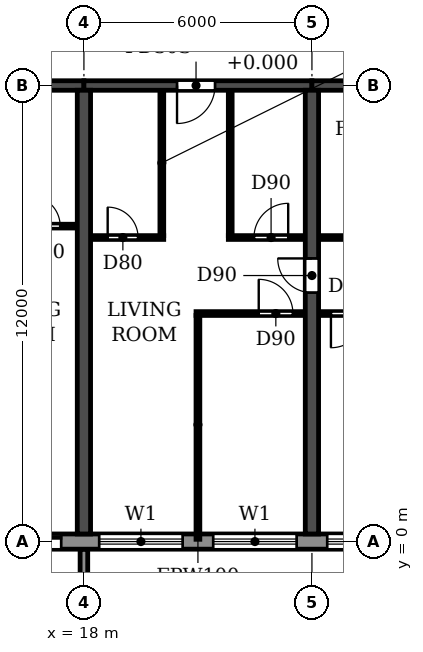
"""IFC4 building model, lengths in metres.
Left out: names, types, materials, properties, quantities, classifications, styles, units other than length and angle.
Written with IfcOpenShell. Run it as: python <this file> out.ifc"""

import sys

from ifc_helpers import new_model, si_unit, direction, frame, frame_2d, origin, place, context, subcontext, project, spatial, polyline, rectangle, outline, extrude, source, transform, mapped, element, fill, save


model = new_model("IFC4")
c1 = context("Model", 3, precision=1e-05, world=origin(), true_north=direction((0.0, 1.0)))
c2 = subcontext(c1, "Body", "Model", "MODEL_VIEW")
j1 = project(units=[si_unit("LENGTHUNIT", "METRE"), si_unit("PLANEANGLEUNIT", "RADIAN")], contexts=[c1])
p1 = place(None, origin())
s1 = spatial("IfcSite", under=j1, at=p1, CompositionType="ELEMENT")
p2 = place(p1, origin())
s2 = spatial("IfcBuilding", under=s1, at=p2, CompositionType="ELEMENT")
p3 = place(p2, frame((0.0, 0.0, 102.6)))
s3 = spatial("IfcBuildingStorey", under=s2, at=p3, CompositionType="ELEMENT", Elevation=102.6)
p4 = place(p3, frame((18.0, 0.2, 0.0), z_axis=(0.0, 0.0, 1.0), x_axis=(0.0, 1.0, 0.0)))
e1 = element("IfcWall", 1, at=p4, inside=s3, PredefinedType="SHEAR", context=c2, shape_type="SweptSolid", body=[
    extrude(rectangle(XDim=11.675, YDim=0.35, at=frame_2d((5.837, 0.0))), origin(), (0.0, 0.0, 1.0), 3.0),
])
p5 = place(p3, frame((24.0, 0.2, 0.0), z_axis=(0.0, 0.0, 1.0), x_axis=(0.0, 1.0, 0.0)))
e2 = element("IfcWall", 2, at=p5, inside=s3, PredefinedType="SHEAR", context=c2, shape_type="SweptSolid", body=[
    extrude(rectangle(XDim=11.675, YDim=0.35, at=frame_2d((5.837, 0.0))), origin(), (0.0, 0.0, 1.0), 3.0),
])
p6 = place(p5, frame((6.35, 0.0, 0.0)))
e3 = element("IfcOpeningElement", 3, at=p6, cuts=e2, PredefinedType="OPENING", context=c2, shape_type="SweptSolid", body=[
    extrude(rectangle(XDim=0.9, YDim=2.1, at=frame_2d((0.45, 1.05))), frame((0.0, 0.185, 0.0), z_axis=(0.0, -1.0, 0.0), x_axis=(1.0, 0.0, 0.0)), (0.0, 0.0, 1.0), 0.37),
])
p7 = place(p3, frame((12.0, 12.0, 0.0), z_axis=(0.0, 0.0, 1.0), x_axis=(1.0, 0.0, 0.0)))
e4 = element("IfcWall", 4, at=p7, inside=s3, PredefinedType="SHEAR", context=c2, shape_type="SweptSolid", body=[
    extrude(rectangle(XDim=6.0, YDim=0.25, at=frame_2d((3.0, 0.0))), origin(), (0.0, 0.0, 1.0), 2.4),
])
p8 = place(p7, frame((2.55, 0.0, 0.0)))
e5 = element("IfcOpeningElement", 5, at=p8, cuts=e4, PredefinedType="OPENING", context=c2, shape_type="SweptSolid", body=[
    extrude(rectangle(XDim=1.0, YDim=2.1, at=frame_2d((0.5, 1.05))), frame((0.0, 0.135, 0.0), z_axis=(0.0, -1.0, 0.0), x_axis=(1.0, 0.0, 0.0)), (0.0, 0.0, 1.0), 0.27),
])
p9 = place(p3, frame((18.0, 12.0, 0.0), z_axis=(0.0, 0.0, 1.0), x_axis=(1.0, 0.0, 0.0)))
e6 = element("IfcWall", 6, at=p9, inside=s3, PredefinedType="SHEAR", context=c2, shape_type="SweptSolid", body=[
    extrude(rectangle(XDim=6.0, YDim=0.25, at=frame_2d((3.0, 0.0))), origin(), (0.0, 0.0, 1.0), 2.4),
])
p10 = place(p9, frame((2.45, 0.0, 0.0)))
e7 = element("IfcOpeningElement", 7, at=p10, cuts=e6, PredefinedType="OPENING", context=c2, shape_type="SweptSolid", body=[
    extrude(rectangle(XDim=1.0, YDim=2.1, at=frame_2d((0.5, 1.05))), frame((0.0, 0.135, 0.0), z_axis=(0.0, -1.0, 0.0), x_axis=(1.0, 0.0, 0.0)), (0.0, 0.0, 1.0), 0.27),
])
p11 = place(p3, frame((24.0, 12.0, 0.0), z_axis=(0.0, 0.0, 1.0), x_axis=(1.0, 0.0, 0.0)))
e8 = element("IfcWall", 8, at=p11, inside=s3, PredefinedType="SHEAR", context=c2, shape_type="SweptSolid", body=[
    extrude(rectangle(XDim=6.0, YDim=0.25, at=frame_2d((3.0, 0.0))), origin(), (0.0, 0.0, 1.0), 2.4),
])
p12 = place(p3, frame((10.683, 0.0, 0.0), z_axis=(0.0, 0.0, 1.0), x_axis=(1.0, 0.0, 0.0)))
e9 = element("IfcWall", 9, at=p12, inside=s3, PredefinedType="STANDARD", context=c2, shape_type="SweptSolid", body=[
    extrude(rectangle(XDim=80.634, YDim=0.4, at=frame_2d((40.317, 0.0))), origin(), (0.0, 0.0, 1.0), 3.0),
])
p13 = place(p12, frame((1.717, 0.0, 0.9)))
e10 = element("IfcOpeningElement", 10, at=p13, cuts=e9, PredefinedType="OPENING", context=c2, shape_type="SweptSolid", body=[
    extrude(rectangle(XDim=2.2, YDim=1.5, at=frame_2d((1.1, 0.75))), frame((0.0, 0.21, 0.0), z_axis=(0.0, -1.0, 0.0), x_axis=(1.0, 0.0, 0.0)), (0.0, 0.0, 1.0), 0.42),
])
p14 = place(p12, frame((4.917, 0.0, 0.0)))
e11 = element("IfcOpeningElement", 11, at=p14, cuts=e9, PredefinedType="OPENING", context=c2, shape_type="SweptSolid", body=[
    extrude(rectangle(XDim=1.8, YDim=2.4, at=frame_2d((0.9, 1.2))), frame((0.0, 0.21, 0.0), z_axis=(0.0, -1.0, 0.0), x_axis=(1.0, 0.0, 0.0)), (0.0, 0.0, 1.0), 0.42),
])
p15 = place(p12, frame((7.717, 0.0, 0.9)))
e12 = element("IfcOpeningElement", 12, at=p15, cuts=e9, PredefinedType="OPENING", context=c2, shape_type="SweptSolid", body=[
    extrude(rectangle(XDim=2.2, YDim=1.5, at=frame_2d((1.1, 0.75))), frame((0.0, 0.21, 0.0), z_axis=(0.0, -1.0, 0.0), x_axis=(1.0, 0.0, 0.0)), (0.0, 0.0, 1.0), 0.42),
])
p16 = place(p12, frame((10.717, 0.0, 0.9)))
e13 = element("IfcOpeningElement", 13, at=p16, cuts=e9, PredefinedType="OPENING", context=c2, shape_type="SweptSolid", body=[
    extrude(rectangle(XDim=2.2, YDim=1.5, at=frame_2d((1.1, 0.75))), frame((0.0, 0.21, 0.0), z_axis=(0.0, -1.0, 0.0), x_axis=(1.0, 0.0, 0.0)), (0.0, 0.0, 1.0), 0.42),
])
p17 = place(p12, frame((13.717, 0.0, 0.9)))
e14 = element("IfcOpeningElement", 14, at=p17, cuts=e9, PredefinedType="OPENING", context=c2, shape_type="SweptSolid", body=[
    extrude(rectangle(XDim=2.2, YDim=1.5, at=frame_2d((1.1, 0.75))), frame((0.0, 0.21, 0.0), z_axis=(0.0, -1.0, 0.0), x_axis=(1.0, 0.0, 0.0)), (0.0, 0.0, 1.0), 0.42),
])
p18 = place(p12, frame((16.717, 0.0, 0.9)))
e15 = element("IfcOpeningElement", 15, at=p18, cuts=e9, PredefinedType="OPENING", context=c2, shape_type="SweptSolid", body=[
    extrude(rectangle(XDim=2.2, YDim=1.5, at=frame_2d((1.1, 0.75))), frame((0.0, 0.21, 0.0), z_axis=(0.0, -1.0, 0.0), x_axis=(1.0, 0.0, 0.0)), (0.0, 0.0, 1.0), 0.42),
])
p19 = place(p12, frame((19.717, 0.0, 0.9)))
e16 = element("IfcOpeningElement", 16, at=p19, cuts=e9, PredefinedType="OPENING", context=c2, shape_type="SweptSolid", body=[
    extrude(rectangle(XDim=2.2, YDim=1.5, at=frame_2d((1.1, 0.75))), frame((0.0, 0.21, 0.0), z_axis=(0.0, -1.0, 0.0), x_axis=(1.0, 0.0, 0.0)), (0.0, 0.0, 1.0), 0.42),
])
p20 = place(p12, frame((22.717, 0.0, 0.9)))
e17 = element("IfcOpeningElement", 17, at=p20, cuts=e9, PredefinedType="OPENING", context=c2, shape_type="SweptSolid", body=[
    extrude(rectangle(XDim=2.2, YDim=1.5, at=frame_2d((1.1, 0.75))), frame((0.0, 0.21, 0.0), z_axis=(0.0, -1.0, 0.0), x_axis=(1.0, 0.0, 0.0)), (0.0, 0.0, 1.0), 0.42),
])
p21 = place(p12, frame((25.717, 0.0, 0.9)))
e18 = element("IfcOpeningElement", 18, at=p21, cuts=e9, PredefinedType="OPENING", context=c2, shape_type="SweptSolid", body=[
    extrude(rectangle(XDim=2.2, YDim=1.5, at=frame_2d((1.1, 0.75))), frame((0.0, 0.21, 0.0), z_axis=(0.0, -1.0, 0.0), x_axis=(1.0, 0.0, 0.0)), (0.0, 0.0, 1.0), 0.42),
])
p22 = place(p12, frame((28.917, 0.0, 0.0)))
e19 = element("IfcOpeningElement", 19, at=p22, cuts=e9, PredefinedType="OPENING", context=c2, shape_type="SweptSolid", body=[
    extrude(rectangle(XDim=1.8, YDim=2.4, at=frame_2d((0.9, 1.2))), frame((0.0, 0.21, 0.0), z_axis=(0.0, -1.0, 0.0), x_axis=(1.0, 0.0, 0.0)), (0.0, 0.0, 1.0), 0.42),
])
p23 = place(p12, frame((31.717, 0.0, 0.9)))
e20 = element("IfcOpeningElement", 20, at=p23, cuts=e9, PredefinedType="OPENING", context=c2, shape_type="SweptSolid", body=[
    extrude(rectangle(XDim=2.2, YDim=1.5, at=frame_2d((1.1, 0.75))), frame((0.0, 0.21, 0.0), z_axis=(0.0, -1.0, 0.0), x_axis=(1.0, 0.0, 0.0)), (0.0, 0.0, 1.0), 0.42),
])
p24 = place(p12, frame((34.717, 0.0, 0.9)))
e21 = element("IfcOpeningElement", 21, at=p24, cuts=e9, PredefinedType="OPENING", context=c2, shape_type="SweptSolid", body=[
    extrude(rectangle(XDim=2.2, YDim=1.5, at=frame_2d((1.1, 0.75))), frame((0.0, 0.21, 0.0), z_axis=(0.0, -1.0, 0.0), x_axis=(1.0, 0.0, 0.0)), (0.0, 0.0, 1.0), 0.42),
])
p25 = place(p12, frame((37.717, 0.0, 0.9)))
e22 = element("IfcOpeningElement", 22, at=p25, cuts=e9, PredefinedType="OPENING", context=c2, shape_type="SweptSolid", body=[
    extrude(rectangle(XDim=2.2, YDim=1.5, at=frame_2d((1.1, 0.75))), frame((0.0, 0.21, 0.0), z_axis=(0.0, -1.0, 0.0), x_axis=(1.0, 0.0, 0.0)), (0.0, 0.0, 1.0), 0.42),
])
p26 = place(p12, frame((40.717, 0.0, 0.9)))
e23 = element("IfcOpeningElement", 23, at=p26, cuts=e9, PredefinedType="OPENING", context=c2, shape_type="SweptSolid", body=[
    extrude(rectangle(XDim=2.2, YDim=1.5, at=frame_2d((1.1, 0.75))), frame((0.0, 0.21, 0.0), z_axis=(0.0, -1.0, 0.0), x_axis=(1.0, 0.0, 0.0)), (0.0, 0.0, 1.0), 0.42),
])
p27 = place(p12, frame((43.717, 0.0, 0.9)))
e24 = element("IfcOpeningElement", 24, at=p27, cuts=e9, PredefinedType="OPENING", context=c2, shape_type="SweptSolid", body=[
    extrude(rectangle(XDim=2.2, YDim=1.5, at=frame_2d((1.1, 0.75))), frame((0.0, 0.21, 0.0), z_axis=(0.0, -1.0, 0.0), x_axis=(1.0, 0.0, 0.0)), (0.0, 0.0, 1.0), 0.42),
])
p28 = place(p12, frame((46.717, 0.0, 0.9)))
e25 = element("IfcOpeningElement", 25, at=p28, cuts=e9, PredefinedType="OPENING", context=c2, shape_type="SweptSolid", body=[
    extrude(rectangle(XDim=2.2, YDim=1.5, at=frame_2d((1.1, 0.75))), frame((0.0, 0.21, 0.0), z_axis=(0.0, -1.0, 0.0), x_axis=(1.0, 0.0, 0.0)), (0.0, 0.0, 1.0), 0.42),
])
p29 = place(p12, frame((49.917, 0.0, 0.0)))
e26 = element("IfcOpeningElement", 26, at=p29, cuts=e9, PredefinedType="OPENING", context=c2, shape_type="SweptSolid", body=[
    extrude(rectangle(XDim=1.8, YDim=2.4, at=frame_2d((0.9, 1.2))), frame((0.0, 0.21, 0.0), z_axis=(0.0, -1.0, 0.0), x_axis=(1.0, 0.0, 0.0)), (0.0, 0.0, 1.0), 0.42),
])
p30 = place(p12, frame((52.717, 0.0, 0.9)))
e27 = element("IfcOpeningElement", 27, at=p30, cuts=e9, PredefinedType="OPENING", context=c2, shape_type="SweptSolid", body=[
    extrude(rectangle(XDim=2.2, YDim=1.5, at=frame_2d((1.1, 0.75))), frame((0.0, 0.21, 0.0), z_axis=(0.0, -1.0, 0.0), x_axis=(1.0, 0.0, 0.0)), (0.0, 0.0, 1.0), 0.42),
])
p31 = place(p12, frame((55.717, 0.0, 0.9)))
e28 = element("IfcOpeningElement", 28, at=p31, cuts=e9, PredefinedType="OPENING", context=c2, shape_type="SweptSolid", body=[
    extrude(rectangle(XDim=2.2, YDim=1.5, at=frame_2d((1.1, 0.75))), frame((0.0, 0.21, 0.0), z_axis=(0.0, -1.0, 0.0), x_axis=(1.0, 0.0, 0.0)), (0.0, 0.0, 1.0), 0.42),
])
p32 = place(p12, frame((58.717, 0.0, 0.9)))
e29 = element("IfcOpeningElement", 29, at=p32, cuts=e9, PredefinedType="OPENING", context=c2, shape_type="SweptSolid", body=[
    extrude(rectangle(XDim=2.2, YDim=1.5, at=frame_2d((1.1, 0.75))), frame((0.0, 0.21, 0.0), z_axis=(0.0, -1.0, 0.0), x_axis=(1.0, 0.0, 0.0)), (0.0, 0.0, 1.0), 0.42),
])
p33 = place(p12, frame((61.717, 0.0, 0.9)))
e30 = element("IfcOpeningElement", 30, at=p33, cuts=e9, PredefinedType="OPENING", context=c2, shape_type="SweptSolid", body=[
    extrude(rectangle(XDim=2.2, YDim=1.5, at=frame_2d((1.1, 0.75))), frame((0.0, 0.21, 0.0), z_axis=(0.0, -1.0, 0.0), x_axis=(1.0, 0.0, 0.0)), (0.0, 0.0, 1.0), 0.42),
])
p34 = place(p12, frame((64.717, 0.0, 0.9)))
e31 = element("IfcOpeningElement", 31, at=p34, cuts=e9, PredefinedType="OPENING", context=c2, shape_type="SweptSolid", body=[
    extrude(rectangle(XDim=2.2, YDim=1.5, at=frame_2d((1.1, 0.75))), frame((0.0, 0.21, 0.0), z_axis=(0.0, -1.0, 0.0), x_axis=(1.0, 0.0, 0.0)), (0.0, 0.0, 1.0), 0.42),
])
p35 = place(p12, frame((67.717, 0.0, 0.9)))
e32 = element("IfcOpeningElement", 32, at=p35, cuts=e9, PredefinedType="OPENING", context=c2, shape_type="SweptSolid", body=[
    extrude(rectangle(XDim=2.2, YDim=1.5, at=frame_2d((1.1, 0.75))), frame((0.0, 0.21, 0.0), z_axis=(0.0, -1.0, 0.0), x_axis=(1.0, 0.0, 0.0)), (0.0, 0.0, 1.0), 0.42),
])
p36 = place(p12, frame((70.717, 0.0, 0.9)))
e33 = element("IfcOpeningElement", 33, at=p36, cuts=e9, PredefinedType="OPENING", context=c2, shape_type="SweptSolid", body=[
    extrude(rectangle(XDim=2.2, YDim=1.5, at=frame_2d((1.1, 0.75))), frame((0.0, 0.21, 0.0), z_axis=(0.0, -1.0, 0.0), x_axis=(1.0, 0.0, 0.0)), (0.0, 0.0, 1.0), 0.42),
])
p37 = place(p12, frame((73.717, 0.0, 0.9)))
e34 = element("IfcOpeningElement", 34, at=p37, cuts=e9, PredefinedType="OPENING", context=c2, shape_type="SweptSolid", body=[
    extrude(rectangle(XDim=2.2, YDim=1.5, at=frame_2d((1.1, 0.75))), frame((0.0, 0.21, 0.0), z_axis=(0.0, -1.0, 0.0), x_axis=(1.0, 0.0, 0.0)), (0.0, 0.0, 1.0), 0.42),
])
p38 = place(p12, frame((76.917, 0.0, 0.0)))
e35 = element("IfcOpeningElement", 35, at=p38, cuts=e9, PredefinedType="OPENING", context=c2, shape_type="SweptSolid", body=[
    extrude(rectangle(XDim=1.8, YDim=2.4, at=frame_2d((0.9, 1.2))), frame((0.0, 0.21, 0.0), z_axis=(0.0, -1.0, 0.0), x_axis=(1.0, 0.0, 0.0)), (0.0, 0.0, 1.0), 0.42),
])
m1 = source(origin(), c2, "Body", "SweptSolid", [
    extrude(outline(polyline([(0.0, 0.0), (0.2, 0.0), (0.2, 1.65), (0.0, 1.65), (0.0, 0.0)])), origin(), (0.0, 0.0, 1.0), 3.1),
])
p39 = place(p3, frame((17.9, -1.85, 0.0)))
e36 = element("IfcWall", 36, at=p39, inside=s3, PredefinedType="STANDARD", context=c2, shape_type="MappedRepresentation", body=[
    mapped(m1, transform((0.0, 0.0, 0.0))),
])
p40 = place(p3, frame((20.95, 6.0, 0.0), z_axis=(0.0, 0.0, 1.0), x_axis=(1.0, 0.0, 0.0)))
e37 = element("IfcWall", 37, at=p40, inside=s3, PredefinedType="PARTITIONING", context=c2, shape_type="SweptSolid", body=[
    extrude(rectangle(XDim=2.865, YDim=0.1, at=frame_2d((1.433, 0.0))), origin(), (0.0, 0.0, 1.0), 3.0),
])
p41 = place(p40, frame((1.65, 0.0, 0.0)))
e38 = element("IfcOpeningElement", 38, at=p41, cuts=e37, PredefinedType="OPENING", context=c2, shape_type="SweptSolid", body=[
    extrude(rectangle(XDim=0.9, YDim=2.1, at=frame_2d((0.45, 1.05))), frame((0.0, 0.06, 0.0), z_axis=(0.0, -1.0, 0.0), x_axis=(1.0, 0.0, 0.0)), (0.0, 0.0, 1.0), 0.12),
])
p42 = place(p3, frame((24.185, 6.0, 0.0), z_axis=(0.0, 0.0, 1.0), x_axis=(1.0, 0.0, 0.0)))
e39 = element("IfcWall", 39, at=p42, inside=s3, PredefinedType="PARTITIONING", context=c2, shape_type="SweptSolid", body=[
    extrude(rectangle(XDim=5.63, YDim=0.1, at=frame_2d((2.815, 0.0))), origin(), (0.0, 0.0, 1.0), 3.0),
])
p43 = place(p42, frame((0.315, 0.0, 0.0)))
e40 = element("IfcOpeningElement", 40, at=p43, cuts=e39, PredefinedType="OPENING", context=c2, shape_type="SweptSolid", body=[
    extrude(rectangle(XDim=0.9, YDim=2.1, at=frame_2d((0.45, 1.05))), frame((0.0, 0.06, 0.0), z_axis=(0.0, -1.0, 0.0), x_axis=(1.0, 0.0, 0.0)), (0.0, 0.0, 1.0), 0.12),
])
p44 = place(p42, frame((4.415, 0.0, 0.0)))
e41 = element("IfcOpeningElement", 41, at=p44, cuts=e39, PredefinedType="OPENING", context=c2, shape_type="SweptSolid", body=[
    extrude(rectangle(XDim=0.9, YDim=2.1, at=frame_2d((0.45, 1.05))), frame((0.0, 0.06, 0.0), z_axis=(0.0, -1.0, 0.0), x_axis=(1.0, 0.0, 0.0)), (0.0, 0.0, 1.0), 0.12),
])
p45 = place(p3, frame((18.185, 8.0, 0.0), z_axis=(0.0, 0.0, 1.0), x_axis=(1.0, 0.0, 0.0)))
e42 = element("IfcWall", 42, at=p45, inside=s3, PredefinedType="PARTITIONING", context=c2, shape_type="SweptSolid", body=[
    extrude(rectangle(XDim=1.915, YDim=0.1, at=frame_2d((0.958, 0.0))), origin(), (0.0, 0.0, 1.0), 3.0),
])
p46 = place(p45, frame((0.44, 0.0, 0.0)))
e43 = element("IfcOpeningElement", 43, at=p46, cuts=e42, PredefinedType="OPENING", context=c2, shape_type="SweptSolid", body=[
    extrude(rectangle(XDim=0.8, YDim=2.1, at=frame_2d((0.4, 1.05))), frame((0.0, 0.06, 0.0), z_axis=(0.0, -1.0, 0.0), x_axis=(1.0, 0.0, 0.0)), (0.0, 0.0, 1.0), 0.12),
])
p47 = place(p3, frame((21.8, 8.0, 0.0), z_axis=(0.0, 0.0, 1.0), x_axis=(1.0, 0.0, 0.0)))
e44 = element("IfcWall", 44, at=p47, inside=s3, PredefinedType="PARTITIONING", context=c2, shape_type="SweptSolid", body=[
    extrude(rectangle(XDim=2.015, YDim=0.1, at=frame_2d((1.007, 0.0))), origin(), (0.0, 0.0, 1.0), 3.0),
])
p48 = place(p47, frame((0.675, 0.0, 0.0)))
e45 = element("IfcOpeningElement", 45, at=p48, cuts=e44, PredefinedType="OPENING", context=c2, shape_type="SweptSolid", body=[
    extrude(rectangle(XDim=0.9, YDim=2.1, at=frame_2d((0.45, 1.05))), frame((0.0, 0.06, 0.0), z_axis=(0.0, -1.0, 0.0), x_axis=(1.0, 0.0, 0.0)), (0.0, 0.0, 1.0), 0.12),
])
p49 = place(p3, frame((24.185, 8.0, 0.0), z_axis=(0.0, 0.0, 1.0), x_axis=(1.0, 0.0, 0.0)))
e46 = element("IfcWall", 46, at=p49, inside=s3, PredefinedType="PARTITIONING", context=c2, shape_type="SweptSolid", body=[
    extrude(rectangle(XDim=3.165, YDim=0.1, at=frame_2d((1.583, 0.0))), origin(), (0.0, 0.0, 1.0), 3.0),
])
p50 = place(p49, frame((1.065, 0.0, 0.0)))
e47 = element("IfcOpeningElement", 47, at=p50, cuts=e46, PredefinedType="OPENING", context=c2, shape_type="SweptSolid", body=[
    extrude(rectangle(XDim=0.8, YDim=2.1, at=frame_2d((0.4, 1.05))), frame((0.0, 0.06, 0.0), z_axis=(0.0, -1.0, 0.0), x_axis=(1.0, 0.0, 0.0)), (0.0, 0.0, 1.0), 0.12),
])
p51 = place(p3, frame((15.9, 8.3, 0.0), z_axis=(0.0, 0.0, 1.0), x_axis=(1.0, 0.0, 0.0)))
e48 = element("IfcWall", 48, at=p51, inside=s3, PredefinedType="PARTITIONING", context=c2, shape_type="SweptSolid", body=[
    extrude(rectangle(XDim=1.915, YDim=0.1, at=frame_2d((0.958, 0.0))), origin(), (0.0, 0.0, 1.0), 3.0),
])
p52 = place(p51, frame((0.675, 0.0, 0.0)))
e49 = element("IfcOpeningElement", 49, at=p52, cuts=e48, PredefinedType="OPENING", context=c2, shape_type="SweptSolid", body=[
    extrude(rectangle(XDim=0.8, YDim=2.1, at=frame_2d((0.4, 1.05))), frame((0.0, 0.06, 0.0), z_axis=(0.0, -1.0, 0.0), x_axis=(1.0, 0.0, 0.0)), (0.0, 0.0, 1.0), 0.12),
])
p53 = place(p3, frame((20.05, 8.05, 0.0), z_axis=(0.0, 0.0, 1.0), x_axis=(0.0, 1.0, 0.0)))
e50 = element("IfcWall", 50, at=p53, inside=s3, PredefinedType="PARTITIONING", context=c2, shape_type="SweptSolid", body=[
    extrude(rectangle(XDim=3.815, YDim=0.1, at=frame_2d((1.907, 0.0))), origin(), (0.0, 0.0, 1.0), 3.0),
])
p54 = place(p3, frame((21.0, 0.06, 0.0), z_axis=(0.0, 0.0, 1.0), x_axis=(0.0, 1.0, 0.0)))
e51 = element("IfcWall", 51, at=p54, inside=s3, PredefinedType="PARTITIONING", context=c2, shape_type="SweptSolid", body=[
    extrude(rectangle(XDim=5.89, YDim=0.1, at=frame_2d((2.945, 0.0))), origin(), (0.0, 0.0, 1.0), 3.0),
])
p55 = place(p3, frame((21.85, 8.05, 0.0), z_axis=(0.0, 0.0, 1.0), x_axis=(0.0, 1.0, 0.0)))
e52 = element("IfcWall", 52, at=p55, inside=s3, PredefinedType="PARTITIONING", context=c2, shape_type="SweptSolid", body=[
    extrude(rectangle(XDim=3.815, YDim=0.1, at=frame_2d((1.907, 0.0))), origin(), (0.0, 0.0, 1.0), 3.0),
])
p56 = place(p14, origin())
e53 = element("IfcDoor", 53, at=p56, inside=s3, OperationType="DOUBLE_DOOR_SLIDING", PredefinedType="DOOR", context=c2, shape_type="SweptSolid", body=[
    extrude(rectangle(XDim=1.8, YDim=2.4, at=frame_2d((0.9, 1.2))), frame((0.0, 0.025, 0.0), z_axis=(0.0, -1.0, 0.0), x_axis=(1.0, 0.0, 0.0)), (0.0, 0.0, 1.0), 0.05),
])
fill(e11, e53)
p57 = place(p15, origin())
e54 = element("IfcWindow", 54, at=p57, inside=s3, PartitioningType="DOUBLE_PANEL_HORIZONTAL", PredefinedType="WINDOW", context=c2, shape_type="SweptSolid", body=[
    extrude(rectangle(XDim=2.2, YDim=1.5, at=frame_2d((1.1, 0.75))), frame((0.0, 0.03, 0.0), z_axis=(0.0, -1.0, 0.0), x_axis=(1.0, 0.0, 0.0)), (0.0, 0.0, 1.0), 0.06),
])
fill(e12, e54)
p58 = place(p16, origin())
e55 = element("IfcWindow", 55, at=p58, inside=s3, PartitioningType="DOUBLE_PANEL_HORIZONTAL", PredefinedType="WINDOW", context=c2, shape_type="SweptSolid", body=[
    extrude(rectangle(XDim=2.2, YDim=1.5, at=frame_2d((1.1, 0.75))), frame((0.0, 0.03, 0.0), z_axis=(0.0, -1.0, 0.0), x_axis=(1.0, 0.0, 0.0)), (0.0, 0.0, 1.0), 0.06),
])
fill(e13, e55)
p59 = place(p17, origin())
e56 = element("IfcWindow", 56, at=p59, inside=s3, PartitioningType="DOUBLE_PANEL_HORIZONTAL", PredefinedType="WINDOW", context=c2, shape_type="SweptSolid", body=[
    extrude(rectangle(XDim=2.2, YDim=1.5, at=frame_2d((1.1, 0.75))), frame((0.0, 0.03, 0.0), z_axis=(0.0, -1.0, 0.0), x_axis=(1.0, 0.0, 0.0)), (0.0, 0.0, 1.0), 0.06),
])
fill(e14, e56)
p60 = place(p52, origin())
e57 = element("IfcDoor", 57, at=p60, inside=s3, OperationType="SINGLE_SWING_LEFT", PredefinedType="DOOR", context=c2, shape_type="SweptSolid", body=[
    extrude(rectangle(XDim=0.8, YDim=2.1, at=frame_2d((0.4, 1.05))), frame((0.0, 0.025, 0.0), z_axis=(0.0, -1.0, 0.0), x_axis=(1.0, 0.0, 0.0)), (0.0, 0.0, 1.0), 0.05),
])
fill(e49, e57)
p61 = place(p43, frame((0.9, 0.0, 0.0), z_axis=(0.0, 0.0, 1.0), x_axis=(-1.0, 0.0, 0.0)))
e58 = element("IfcDoor", 58, at=p61, inside=s3, OperationType="SINGLE_SWING_RIGHT", PredefinedType="DOOR", context=c2, shape_type="SweptSolid", body=[
    extrude(rectangle(XDim=0.9, YDim=2.1, at=frame_2d((0.45, 1.05))), frame((0.0, 0.025, 0.0), z_axis=(0.0, -1.0, 0.0), x_axis=(1.0, 0.0, 0.0)), (0.0, 0.0, 1.0), 0.05),
])
fill(e40, e58)
p62 = place(p46, origin())
e59 = element("IfcDoor", 59, at=p62, inside=s3, OperationType="SINGLE_SWING_LEFT", PredefinedType="DOOR", context=c2, shape_type="SweptSolid", body=[
    extrude(rectangle(XDim=0.8, YDim=2.1, at=frame_2d((0.4, 1.05))), frame((0.0, 0.025, 0.0), z_axis=(0.0, -1.0, 0.0), x_axis=(1.0, 0.0, 0.0)), (0.0, 0.0, 1.0), 0.05),
])
fill(e43, e59)
p63 = place(p10, frame((1.0, 0.0, 0.0), z_axis=(0.0, 0.0, 1.0), x_axis=(-1.0, 0.0, 0.0)))
e60 = element("IfcDoor", 60, at=p63, inside=s3, OperationType="SINGLE_SWING_RIGHT", PredefinedType="DOOR", context=c2, shape_type="SweptSolid", body=[
    extrude(rectangle(XDim=1.0, YDim=2.1, at=frame_2d((0.5, 1.05))), frame((0.0, 0.025, 0.0), z_axis=(0.0, -1.0, 0.0), x_axis=(1.0, 0.0, 0.0)), (0.0, 0.0, 1.0), 0.05),
])
fill(e7, e60)
p64 = place(p48, origin())
e61 = element("IfcDoor", 61, at=p64, inside=s3, OperationType="SINGLE_SWING_RIGHT", PredefinedType="DOOR", context=c2, shape_type="SweptSolid", body=[
    extrude(rectangle(XDim=0.9, YDim=2.1, at=frame_2d((0.45, 1.05))), frame((0.0, 0.025, 0.0), z_axis=(0.0, -1.0, 0.0), x_axis=(1.0, 0.0, 0.0)), (0.0, 0.0, 1.0), 0.05),
])
fill(e45, e61)
p65 = place(p41, origin())
e62 = element("IfcDoor", 62, at=p65, inside=s3, OperationType="SINGLE_SWING_LEFT", PredefinedType="DOOR", context=c2, shape_type="SweptSolid", body=[
    extrude(rectangle(XDim=0.9, YDim=2.1, at=frame_2d((0.45, 1.05))), frame((0.0, 0.025, 0.0), z_axis=(0.0, -1.0, 0.0), x_axis=(1.0, 0.0, 0.0)), (0.0, 0.0, 1.0), 0.05),
])
fill(e38, e62)
p66 = place(p6, origin())
e63 = element("IfcDoor", 63, at=p66, inside=s3, OperationType="SINGLE_SWING_RIGHT", PredefinedType="DOOR", context=c2, shape_type="SweptSolid", body=[
    extrude(rectangle(XDim=0.9, YDim=2.1, at=frame_2d((0.45, 1.05))), frame((0.0, 0.025, 0.0), z_axis=(0.0, -1.0, 0.0), x_axis=(1.0, 0.0, 0.0)), (0.0, 0.0, 1.0), 0.05),
])
fill(e3, e63)
save(model, sys.argv[1])
